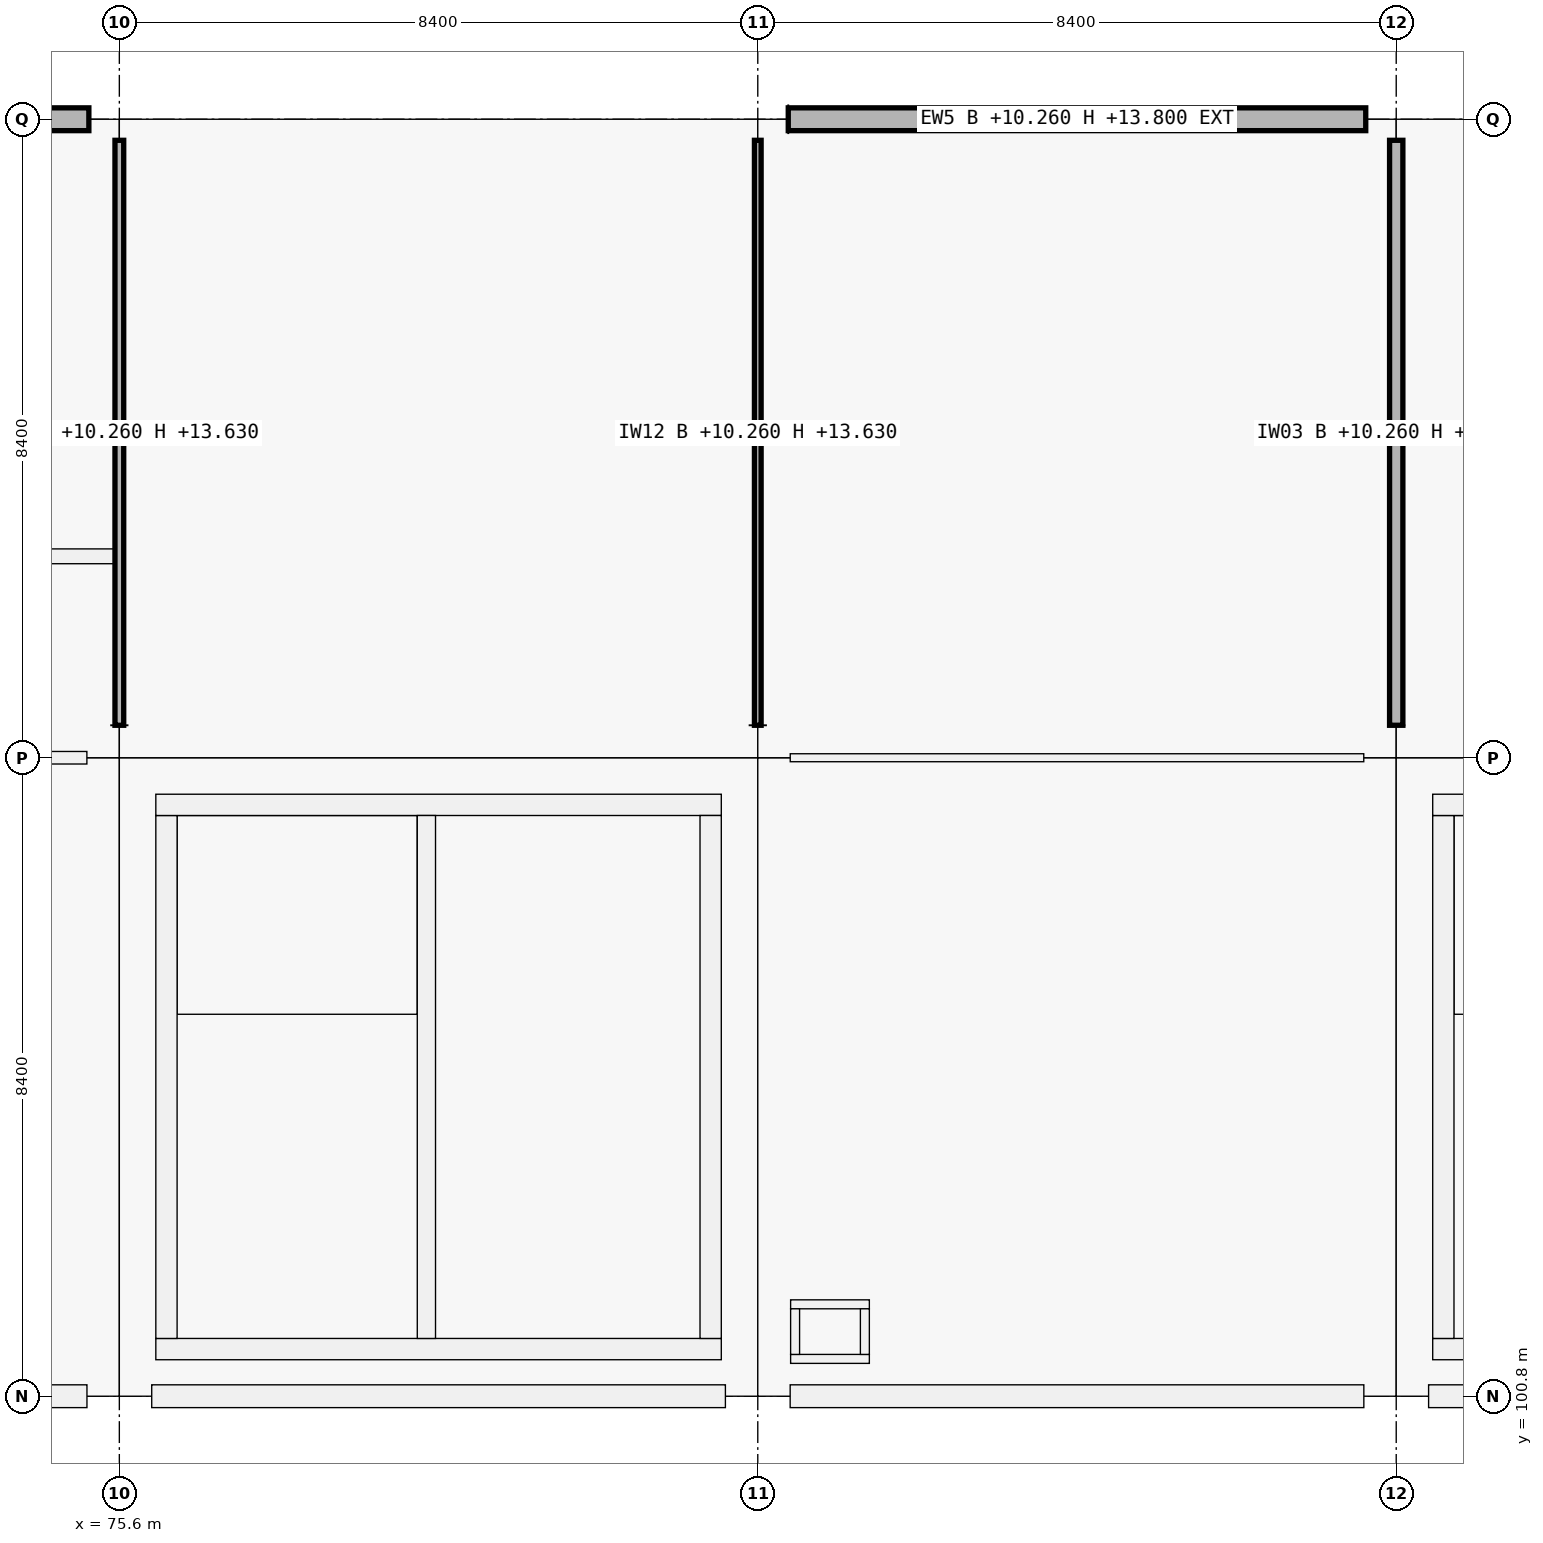
"""IFC4 building model, lengths in metres.
Left out: names, types, materials, properties, quantities, classifications, styles, units other than length and angle.
Written with IfcOpenShell. Run it as: python <this file> out.ifc"""

import sys

from ifc_helpers import new_model, si_unit, direction, frame, frame_2d, origin, origin_2d, place, context, subcontext, project, spatial, rectangle, extrude, element, fill, save


model = new_model("IFC4")
c1 = context("Model", 3, precision=1e-05, world=origin(), true_north=direction((0.0, 1.0)))
c2 = subcontext(c1, "Body", "Model", "MODEL_VIEW")
j1 = project(units=[si_unit("LENGTHUNIT", "METRE"), si_unit("PLANEANGLEUNIT", "RADIAN")], contexts=[c1])
p1 = place(None, origin())
s1 = spatial("IfcSite", under=j1, at=p1, CompositionType="ELEMENT")
p2 = place(p1, origin())
s2 = spatial("IfcBuilding", under=s1, at=p2, CompositionType="ELEMENT")
p3 = place(p2, frame((0.0, 0.0, 10.26)))
s3 = spatial("IfcBuildingStorey", under=s2, at=p3, CompositionType="ELEMENT", Elevation=10.26)
for number, where, z_axis, x_axis in (
    (1, (75.6, 100.8, 0.0), (0.0, 0.0, 1.0), (1.0, 0.0, 0.0)),
    (2, (75.6, 109.2, 0.0), (0.0, 0.0, 1.0), (1.0, 0.0, 0.0)),
):
    element("IfcColumn", number, at=place(p3, frame(where, z_axis=z_axis, x_axis=x_axis)), inside=s3, PredefinedType="COLUMN", context=c2, shape_type="SweptSolid", body=[
        extrude(rectangle(XDim=0.85, YDim=0.85, at=origin_2d()), origin(), (0.0, 0.0, 1.0), 4.5),
    ])
p4 = place(p3, frame((75.6, 117.6, 0.0), z_axis=(0.0, 0.0, 1.0), x_axis=(1.0, 0.0, 0.0)))
e3 = element("IfcColumn", 3, at=p4, inside=s3, PredefinedType="COLUMN", context=c2, shape_type="SweptSolid", body=[
    extrude(rectangle(XDim=0.8, YDim=0.55, at=origin_2d()), origin(), (0.0, 0.0, 1.0), 4.5),
])
for number, where, z_axis, x_axis in (
    (4, (84.0, 100.8, 0.0), (0.0, 0.0, 1.0), (1.0, 0.0, 0.0)),
    (5, (84.0, 109.2, 0.0), (0.0, 0.0, 1.0), (1.0, 0.0, 0.0)),
):
    element("IfcColumn", number, at=place(p3, frame(where, z_axis=z_axis, x_axis=x_axis)), inside=s3, PredefinedType="COLUMN", context=c2, shape_type="SweptSolid", body=[
        extrude(rectangle(XDim=0.85, YDim=0.85, at=origin_2d()), origin(), (0.0, 0.0, 1.0), 4.5),
    ])
p5 = place(p3, frame((84.0, 117.6, 0.0), z_axis=(0.0, 0.0, 1.0), x_axis=(1.0, 0.0, 0.0)))
e6 = element("IfcColumn", 6, at=p5, inside=s3, PredefinedType="COLUMN", context=c2, shape_type="SweptSolid", body=[
    extrude(rectangle(XDim=0.8, YDim=0.55, at=origin_2d()), origin(), (0.0, 0.0, 1.0), 4.5),
])
for number, where, z_axis, x_axis in (
    (7, (92.4, 100.8, 0.0), (0.0, 0.0, 1.0), (1.0, 0.0, 0.0)),
    (8, (92.4, 109.2, 0.0), (0.0, 0.0, 1.0), (1.0, 0.0, 0.0)),
):
    element("IfcColumn", number, at=place(p3, frame(where, z_axis=z_axis, x_axis=x_axis)), inside=s3, PredefinedType="COLUMN", context=c2, shape_type="SweptSolid", body=[
        extrude(rectangle(XDim=0.85, YDim=0.85, at=origin_2d()), origin(), (0.0, 0.0, 1.0), 4.5),
    ])
p6 = place(p3, frame((92.4, 117.6, 0.0), z_axis=(0.0, 0.0, 1.0), x_axis=(1.0, 0.0, 0.0)))
e9 = element("IfcColumn", 9, at=p6, inside=s3, PredefinedType="COLUMN", context=c2, shape_type="SweptSolid", body=[
    extrude(rectangle(XDim=0.8, YDim=0.55, at=origin_2d()), origin(), (0.0, 0.0, 1.0), 4.5),
])
p7 = place(p3, frame((75.174, 100.8, 0.0), z_axis=(0.0, 0.0, 1.0), x_axis=(-1.0, 0.0, 0.0)))
e10 = element("IfcWall", 10, at=p7, inside=s3, PredefinedType="SOLIDWALL", context=c2, shape_type="SweptSolid", body=[
    extrude(rectangle(XDim=7.548, YDim=0.3, at=frame_2d((3.774, 0.0))), origin(), (0.0, 0.0, 1.0), 3.54),
])
p8 = place(p3, frame((67.601, 117.6, 0.0), z_axis=(0.0, 0.0, 1.0), x_axis=(1.0, 0.0, 0.0)))
e11 = element("IfcWall", 11, at=p8, inside=s3, PredefinedType="SOLIDWALL", context=c2, shape_type="SweptSolid", body=[
    extrude(rectangle(XDim=7.598, YDim=0.3, at=frame_2d((3.799, 0.0))), origin(), (0.0, 0.0, 1.0), 3.54),
])
p9 = place(p8, frame((3.124, 0.0, 0.9)))
e12 = element("IfcOpeningElement", 12, at=p9, cuts=e11, PredefinedType="OPENING", context=c2, shape_type="SweptSolid", body=[
    extrude(rectangle(XDim=1.35, YDim=1.5, at=frame_2d((0.675, 0.75))), frame((0.0, 0.15, 0.0), z_axis=(0.0, -1.0, 0.0), x_axis=(1.0, 0.0, 0.0)), (0.0, 0.0, 1.0), 0.3),
])
p10 = place(p3, frame((83.574, 100.8, 0.0), z_axis=(0.0, 0.0, 1.0), x_axis=(-1.0, 0.0, 0.0)))
e13 = element("IfcWall", 13, at=p10, inside=s3, PredefinedType="SOLIDWALL", context=c2, shape_type="SweptSolid", body=[
    extrude(rectangle(XDim=7.548, YDim=0.3, at=frame_2d((3.774, 0.0))), origin(), (0.0, 0.0, 1.0), 3.54),
])
p11 = place(p3, frame((91.974, 100.8, 0.0), z_axis=(0.0, 0.0, 1.0), x_axis=(-1.0, 0.0, 0.0)))
e14 = element("IfcWall", 14, at=p11, inside=s3, PredefinedType="SOLIDWALL", context=c2, shape_type="SweptSolid", body=[
    extrude(rectangle(XDim=7.548, YDim=0.3, at=frame_2d((3.774, 0.0))), origin(), (0.0, 0.0, 1.0), 3.54),
])
p12 = place(p11, frame((3.324, 0.0, 0.9)))
e15 = element("IfcOpeningElement", 15, at=p12, cuts=e14, PredefinedType="OPENING", context=c2, shape_type="SweptSolid", body=[
    extrude(rectangle(XDim=0.9, YDim=1.5, at=frame_2d((0.45, 0.75))), frame((0.0, 0.15, 0.0), z_axis=(0.0, -1.0, 0.0), x_axis=(1.0, 0.0, 0.0)), (0.0, 0.0, 1.0), 0.3),
])
p13 = place(p3, frame((84.401, 117.6, 0.0), z_axis=(0.0, 0.0, 1.0), x_axis=(1.0, 0.0, 0.0)))
e16 = element("IfcWall", 16, at=p13, inside=s3, PredefinedType="SOLIDWALL", context=c2, shape_type="SweptSolid", body=[
    extrude(rectangle(XDim=7.598, YDim=0.3, at=frame_2d((3.799, 0.0))), origin(), (0.0, 0.0, 1.0), 3.54),
])
p14 = place(p13, frame((2.949, 0.0, 0.9)))
e17 = element("IfcOpeningElement", 17, at=p14, cuts=e16, PredefinedType="OPENING", context=c2, shape_type="SweptSolid", body=[
    extrude(rectangle(XDim=1.7, YDim=1.85, at=frame_2d((0.85, 0.925))), frame((0.0, 0.15, 0.0), z_axis=(0.0, -1.0, 0.0), x_axis=(1.0, 0.0, 0.0)), (0.0, 0.0, 1.0), 0.3),
])
p15 = place(p3, frame((100.374, 100.8, 0.0), z_axis=(0.0, 0.0, 1.0), x_axis=(-1.0, 0.0, 0.0)))
e18 = element("IfcWall", 18, at=p15, inside=s3, PredefinedType="SOLIDWALL", context=c2, shape_type="SweptSolid", body=[
    extrude(rectangle(XDim=7.548, YDim=0.3, at=frame_2d((3.774, 0.0))), origin(), (0.0, 0.0, 1.0), 3.54),
])
p16 = place(p3, frame((83.52, 101.42, 0.0), z_axis=(0.0, 0.0, 1.0), x_axis=(-1.0, 0.0, 0.0)))
e19 = element("IfcWall", 19, at=p16, inside=s3, PredefinedType="SHEAR", context=c2, shape_type="SweptSolid", body=[
    extrude(rectangle(XDim=7.44, YDim=0.28, at=frame_2d((3.72, 0.0))), origin(), (0.0, 0.0, 1.0), 4.5),
])
p17 = place(p3, frame((76.22, 101.56, 0.0), z_axis=(0.0, 0.0, 1.0), x_axis=(0.0, 1.0, 0.0)))
e20 = element("IfcWall", 20, at=p17, inside=s3, PredefinedType="SHEAR", context=c2, shape_type="SweptSolid", body=[
    extrude(rectangle(XDim=6.88, YDim=0.28, at=frame_2d((3.44, 0.0))), origin(), (0.0, 0.0, 1.0), 4.5),
])
p18 = place(p3, frame((76.08, 108.58, 0.0), z_axis=(0.0, 0.0, 1.0), x_axis=(1.0, 0.0, 0.0)))
e21 = element("IfcWall", 21, at=p18, inside=s3, PredefinedType="SHEAR", context=c2, shape_type="SweptSolid", body=[
    extrude(rectangle(XDim=7.44, YDim=0.28, at=frame_2d((3.72, 0.0))), origin(), (0.0, 0.0, 1.0), 4.5),
])
p19 = place(p3, frame((83.38, 108.44, 0.0), z_axis=(0.0, 0.0, 1.0), x_axis=(0.0, -1.0, 0.0)))
e22 = element("IfcWall", 22, at=p19, inside=s3, PredefinedType="SHEAR", context=c2, shape_type="SweptSolid", body=[
    extrude(rectangle(XDim=6.88, YDim=0.28, at=frame_2d((3.44, 0.0))), origin(), (0.0, 0.0, 1.0), 4.5),
])
p20 = place(p19, frame((3.99, 0.0, 0.0)))
e23 = element("IfcOpeningElement", 23, at=p20, cuts=e22, PredefinedType="OPENING", context=c2, shape_type="SweptSolid", body=[
    extrude(rectangle(XDim=1.5, YDim=2.15, at=frame_2d((0.75, 1.075))), frame((0.0, 0.14, 0.0), z_axis=(0.0, -1.0, 0.0), x_axis=(1.0, 0.0, 0.0)), (0.0, 0.0, 1.0), 0.28),
])
p21 = place(p3, frame((79.64, 101.56, 0.0), z_axis=(0.0, 0.0, 1.0), x_axis=(0.0, 1.0, 0.0)))
e24 = element("IfcWall", 24, at=p21, inside=s3, PredefinedType="SHEAR", context=c2, shape_type="SweptSolid", body=[
    extrude(rectangle(XDim=6.88, YDim=0.24, at=frame_2d((3.44, 0.0))), origin(), (0.0, 0.0, 1.0), 4.5),
])
p22 = place(p21, frame((0.12, 0.0, 0.0)))
e25 = element("IfcOpeningElement", 25, at=p22, cuts=e24, PredefinedType="OPENING", context=c2, shape_type="SweptSolid", body=[
    extrude(rectangle(XDim=1.0, YDim=2.15, at=frame_2d((0.5, 1.075))), frame((0.0, 0.12, 0.0), z_axis=(0.0, -1.0, 0.0), x_axis=(1.0, 0.0, 0.0)), (0.0, 0.0, 1.0), 0.24),
])
p23 = place(p3, frame((100.32, 101.42, 0.0), z_axis=(0.0, 0.0, 1.0), x_axis=(-1.0, 0.0, 0.0)))
e26 = element("IfcWall", 26, at=p23, inside=s3, PredefinedType="SHEAR", context=c2, shape_type="SweptSolid", body=[
    extrude(rectangle(XDim=7.44, YDim=0.28, at=frame_2d((3.72, 0.0))), origin(), (0.0, 0.0, 1.0), 4.5),
])
p24 = place(p3, frame((93.02, 101.56, 0.0), z_axis=(0.0, 0.0, 1.0), x_axis=(0.0, 1.0, 0.0)))
e27 = element("IfcWall", 27, at=p24, inside=s3, PredefinedType="SHEAR", context=c2, shape_type="SweptSolid", body=[
    extrude(rectangle(XDim=6.88, YDim=0.28, at=frame_2d((3.44, 0.0))), origin(), (0.0, 0.0, 1.0), 4.5),
])
p25 = place(p3, frame((92.88, 108.58, 0.0), z_axis=(0.0, 0.0, 1.0), x_axis=(1.0, 0.0, 0.0)))
e28 = element("IfcWall", 28, at=p25, inside=s3, PredefinedType="SHEAR", context=c2, shape_type="SweptSolid", body=[
    extrude(rectangle(XDim=7.44, YDim=0.28, at=frame_2d((3.72, 0.0))), origin(), (0.0, 0.0, 1.0), 4.5),
])
for number, where, z_axis, x_axis in (
    (29, (84.432, 101.291, 0.0), (0.0, 0.0, 1.0), (1.0, 0.0, 0.0)),
    (30, (84.432, 102.009, 0.0), (0.0, 0.0, 1.0), (1.0, 0.0, 0.0)),
):
    element("IfcWall", number, at=place(p3, frame(where, z_axis=z_axis, x_axis=x_axis)), inside=s3, PredefinedType="PARTITIONING", context=c2, shape_type="SweptSolid", body=[
        extrude(rectangle(XDim=1.036, YDim=0.118, at=frame_2d((0.518, 0.0))), origin(), (0.0, 0.0, 1.0), 3.53),
    ])
for number, where, z_axis, x_axis in (
    (31, (84.491, 101.35, 0.0), (0.0, 0.0, 1.0), (0.0, 1.0, 0.0)),
    (32, (85.409, 101.35, 0.0), (0.0, 0.0, 1.0), (0.0, 1.0, 0.0)),
):
    element("IfcWall", number, at=place(p3, frame(where, z_axis=z_axis, x_axis=x_axis)), inside=s3, PredefinedType="PARTITIONING", context=c2, shape_type="SweptSolid", body=[
        extrude(rectangle(XDim=0.6, YDim=0.118, at=frame_2d((0.3, 0.0))), origin(), (0.0, 0.0, 1.0), 3.53),
    ])
p26 = place(p3, frame((67.627, 109.2, 0.0), z_axis=(0.0, 0.0, 1.0), x_axis=(1.0, 0.0, 0.0)))
e33 = element("IfcWall", 33, at=p26, inside=s3, PredefinedType="PARTITIONING", context=c2, shape_type="SweptSolid", body=[
    extrude(rectangle(XDim=7.546, YDim=0.165, at=frame_2d((3.773, 0.0))), origin(), (0.0, 0.0, 1.0), 3.37),
])
p27 = place(p3, frame((84.427, 109.2, 0.0), z_axis=(0.0, 0.0, 1.0), x_axis=(1.0, 0.0, 0.0)))
e34 = element("IfcWall", 34, at=p27, inside=s3, PredefinedType="PARTITIONING", context=c2, shape_type="SweptSolid", body=[
    extrude(rectangle(XDim=7.546, YDim=0.105, at=frame_2d((3.773, 0.0))), origin(), (0.0, 0.0, 1.0), 3.37),
])
p28 = place(p27, frame((3.288, 0.0, 0.0)))
e35 = element("IfcOpeningElement", 35, at=p28, cuts=e34, PredefinedType="OPENING", context=c2, shape_type="SweptSolid", body=[
    extrude(rectangle(XDim=0.97, YDim=2.12, at=frame_2d((0.485, 1.06))), frame((0.0, 0.052, 0.0), z_axis=(0.0, -1.0, 0.0), x_axis=(1.0, 0.0, 0.0)), (0.0, 0.0, 1.0), 0.105),
])
p29 = place(p3, frame((75.6, 109.627, 0.0), z_axis=(0.0, 0.0, 1.0), x_axis=(0.0, 1.0, 0.0)))
e36 = element("IfcWall", 36, at=p29, inside=s3, PredefinedType="PARTITIONING", context=c2, shape_type="SweptSolid", body=[
    extrude(rectangle(XDim=7.696, YDim=0.115, at=frame_2d((3.848, 0.0))), origin(), (0.0, 0.0, 1.0), 3.37),
])
p30 = place(p3, frame((84.0, 109.627, 0.0), z_axis=(0.0, 0.0, 1.0), x_axis=(0.0, 1.0, 0.0)))
e37 = element("IfcWall", 37, at=p30, inside=s3, PredefinedType="PARTITIONING", context=c2, shape_type="SweptSolid", body=[
    extrude(rectangle(XDim=7.696, YDim=0.088, at=frame_2d((3.848, 0.0))), origin(), (0.0, 0.0, 1.0), 3.37),
])
p31 = place(p30, frame((3.343, 0.0, 0.0)))
e38 = element("IfcOpeningElement", 38, at=p31, cuts=e37, PredefinedType="OPENING", context=c2, shape_type="SweptSolid", body=[
    extrude(rectangle(XDim=1.01, YDim=2.12, at=frame_2d((0.505, 1.06))), frame((0.0, 0.044, 0.0), z_axis=(0.0, -1.0, 0.0), x_axis=(1.0, 0.0, 0.0)), (0.0, 0.0, 1.0), 0.088),
])
p32 = place(p3, frame((92.4, 109.627, 0.0), z_axis=(0.0, 0.0, 1.0), x_axis=(0.0, 1.0, 0.0)))
e39 = element("IfcWall", 39, at=p32, inside=s3, PredefinedType="PARTITIONING", context=c2, shape_type="SweptSolid", body=[
    extrude(rectangle(XDim=7.696, YDim=0.175, at=frame_2d((3.848, 0.0))), origin(), (0.0, 0.0, 1.0), 3.37),
])
p33 = place(p32, frame((3.363, 0.0, 0.0)))
e40 = element("IfcOpeningElement", 40, at=p33, cuts=e39, PredefinedType="OPENING", context=c2, shape_type="SweptSolid", body=[
    extrude(rectangle(XDim=0.97, YDim=2.12, at=frame_2d((0.485, 1.06))), frame((0.0, 0.087, 0.0), z_axis=(0.0, -1.0, 0.0), x_axis=(1.0, 0.0, 0.0)), (0.0, 0.0, 1.0), 0.175),
])
p34 = place(p3, frame((67.274, 111.85, 0.0), z_axis=(0.0, 0.0, 1.0), x_axis=(1.0, 0.0, 0.0)))
e41 = element("IfcWall", 41, at=p34, inside=s3, PredefinedType="PARTITIONING", context=c2, shape_type="SweptSolid", body=[
    extrude(rectangle(XDim=8.266, YDim=0.195, at=frame_2d((4.133, 0.0))), origin(), (0.0, 0.0, 1.0), 3.37),
])
p35 = place(p12, origin())
e42 = element("IfcWindow", 42, at=p35, inside=s3, PartitioningType="SINGLE_PANEL", PredefinedType="WINDOW", context=c2, shape_type="SweptSolid", body=[
    extrude(rectangle(XDim=0.9, YDim=1.5, at=frame_2d((0.45, 0.75))), frame((0.0, 0.03, 0.0), z_axis=(0.0, -1.0, 0.0), x_axis=(1.0, 0.0, 0.0)), (0.0, 0.0, 1.0), 0.06),
])
fill(e15, e42)
p36 = place(p14, origin())
e43 = element("IfcWindow", 43, at=p36, inside=s3, PartitioningType="SINGLE_PANEL", PredefinedType="WINDOW", context=c2, shape_type="SweptSolid", body=[
    extrude(rectangle(XDim=1.7, YDim=1.85, at=frame_2d((0.85, 0.925))), frame((0.0, 0.03, 0.0), z_axis=(0.0, -1.0, 0.0), x_axis=(1.0, 0.0, 0.0)), (0.0, 0.0, 1.0), 0.06),
])
fill(e17, e43)
p37 = place(p22, origin())
e44 = element("IfcDoor", 44, at=p37, inside=s3, OperationType="SINGLE_SWING_RIGHT", PredefinedType="DOOR", context=c2, shape_type="SweptSolid", body=[
    extrude(rectangle(XDim=1.0, YDim=2.15, at=frame_2d((0.5, 1.075))), frame((0.0, 0.025, 0.0), z_axis=(0.0, -1.0, 0.0), x_axis=(1.0, 0.0, 0.0)), (0.0, 0.0, 1.0), 0.05),
])
fill(e25, e44)
p38 = place(p20, origin())
e45 = element("IfcDoor", 45, at=p38, inside=s3, OperationType="DOUBLE_DOOR_SINGLE_SWING", PredefinedType="DOOR", context=c2, shape_type="SweptSolid", body=[
    extrude(rectangle(XDim=1.5, YDim=2.15, at=frame_2d((0.75, 1.075))), frame((0.0, 0.025, 0.0), z_axis=(0.0, -1.0, 0.0), x_axis=(1.0, 0.0, 0.0)), (0.0, 0.0, 1.0), 0.05),
])
fill(e23, e45)
p39 = place(p28, origin())
e46 = element("IfcDoor", 46, at=p39, inside=s3, OperationType="SINGLE_SWING_LEFT", PredefinedType="DOOR", context=c2, shape_type="SweptSolid", body=[
    extrude(rectangle(XDim=0.97, YDim=2.12, at=frame_2d((0.485, 1.06))), frame((0.0, 0.025, 0.0), z_axis=(0.0, -1.0, 0.0), x_axis=(1.0, 0.0, 0.0)), (0.0, 0.0, 1.0), 0.05),
])
fill(e35, e46)
p40 = place(p31, origin())
e47 = element("IfcDoor", 47, at=p40, inside=s3, OperationType="SINGLE_SWING_RIGHT", PredefinedType="DOOR", context=c2, shape_type="SweptSolid", body=[
    extrude(rectangle(XDim=1.01, YDim=2.12, at=frame_2d((0.505, 1.06))), frame((0.0, 0.025, 0.0), z_axis=(0.0, -1.0, 0.0), x_axis=(1.0, 0.0, 0.0)), (0.0, 0.0, 1.0), 0.05),
])
fill(e38, e47)
p41 = place(p33, origin())
e48 = element("IfcDoor", 48, at=p41, inside=s3, OperationType="SINGLE_SWING_LEFT", PredefinedType="DOOR", context=c2, shape_type="SweptSolid", body=[
    extrude(rectangle(XDim=0.97, YDim=2.12, at=frame_2d((0.485, 1.06))), frame((0.0, 0.025, 0.0), z_axis=(0.0, -1.0, 0.0), x_axis=(1.0, 0.0, 0.0)), (0.0, 0.0, 1.0), 0.05),
])
fill(e40, e48)
save(model, sys.argv[1])
